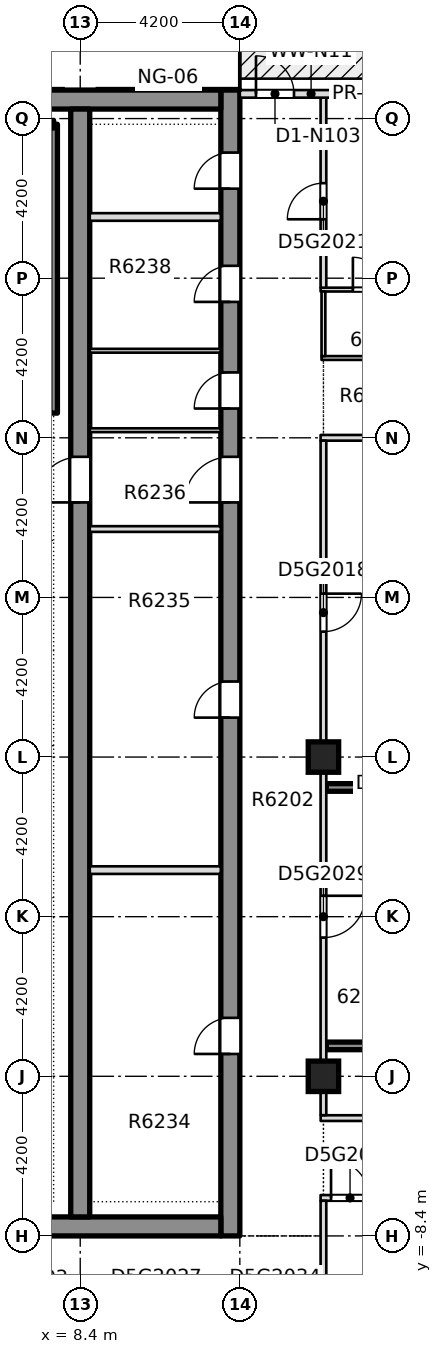
"""IFC4 building model, lengths in metres.
Left out: names, types, materials, properties, quantities, classifications, styles, units other than length and angle.
Written with IfcOpenShell. Run it as: python <this file> out.ifc"""

import sys

from ifc_helpers import new_model, si_unit, direction, frame, frame_2d, origin, origin_2d, place, context, subcontext, project, spatial, rectangle, extrude, element, fill, save


model = new_model("IFC4")
c1 = context("Model", 3, precision=1e-05, world=origin(), true_north=direction((0.0, 1.0)))
c2 = subcontext(c1, "Body", "Model", "MODEL_VIEW")
j1 = project(units=[si_unit("LENGTHUNIT", "METRE"), si_unit("PLANEANGLEUNIT", "RADIAN")], contexts=[c1])
p1 = place(None, origin())
s1 = spatial("IfcSite", under=j1, at=p1, CompositionType="ELEMENT")
p2 = place(p1, origin())
s2 = spatial("IfcBuilding", under=s1, at=p2, CompositionType="ELEMENT")
p3 = place(p2, frame((0.0, 0.0, 237.25)))
s3 = spatial("IfcBuildingStorey", under=s2, at=p3, CompositionType="ELEMENT", Elevation=237.25)
p4 = place(p3, frame((12.35, -8.4, -0.4), z_axis=(0.0, 0.0, 1.0), x_axis=(0.0, 1.0, 0.0)))
e1 = element("IfcWall", 1, at=p4, inside=s3, PredefinedType="SHEAR", context=c2, shape_type="SweptSolid", body=[
    extrude(rectangle(XDim=30.15, YDim=0.5, at=frame_2d((15.075, 0.0))), origin(), (0.0, 0.0, 1.0), 3.45),
])
p5 = place(p4, frame((4.788, 0.0, 0.4)))
e2 = element("IfcOpeningElement", 2, at=p5, cuts=e1, PredefinedType="OPENING", context=c2, shape_type="SweptSolid", body=[
    extrude(rectangle(XDim=0.95, YDim=2.1, at=frame_2d((0.475, 1.05))), frame((0.0, 0.26, 0.0), z_axis=(0.0, -1.0, 0.0), x_axis=(1.0, 0.0, 0.0)), (0.0, 0.0, 1.0), 0.52),
])
p6 = place(p4, frame((13.638, 0.0, 0.4)))
e3 = element("IfcOpeningElement", 3, at=p6, cuts=e1, PredefinedType="OPENING", context=c2, shape_type="SweptSolid", body=[
    extrude(rectangle(XDim=0.95, YDim=2.1, at=frame_2d((0.475, 1.05))), frame((0.0, 0.26, 0.0), z_axis=(0.0, -1.0, 0.0), x_axis=(1.0, 0.0, 0.0)), (0.0, 0.0, 1.0), 0.52),
])
p7 = place(p4, frame((21.771, 0.0, 0.4)))
e4 = element("IfcOpeningElement", 4, at=p7, cuts=e1, PredefinedType="OPENING", context=c2, shape_type="SweptSolid", body=[
    extrude(rectangle(XDim=0.95, YDim=2.1, at=frame_2d((0.475, 1.05))), frame((0.0, 0.26, 0.0), z_axis=(0.0, -1.0, 0.0), x_axis=(1.0, 0.0, 0.0)), (0.0, 0.0, 1.0), 0.52),
])
p8 = place(p4, frame((24.576, 0.0, 0.4)))
e5 = element("IfcOpeningElement", 5, at=p8, cuts=e1, PredefinedType="OPENING", context=c2, shape_type="SweptSolid", body=[
    extrude(rectangle(XDim=0.95, YDim=2.1, at=frame_2d((0.475, 1.05))), frame((0.0, 0.26, 0.0), z_axis=(0.0, -1.0, 0.0), x_axis=(1.0, 0.0, 0.0)), (0.0, 0.0, 1.0), 0.52),
])
p9 = place(p4, frame((27.555, 0.0, 0.4)))
e6 = element("IfcOpeningElement", 6, at=p9, cuts=e1, PredefinedType="OPENING", context=c2, shape_type="SweptSolid", body=[
    extrude(rectangle(XDim=0.95, YDim=2.1, at=frame_2d((0.475, 1.05))), frame((0.0, 0.26, 0.0), z_axis=(0.0, -1.0, 0.0), x_axis=(1.0, 0.0, 0.0)), (0.0, 0.0, 1.0), 0.52),
])
p10 = place(p4, frame((19.3, 0.0, 0.4)))
e7 = element("IfcOpeningElement", 7, at=p10, cuts=e1, PredefinedType="OPENING", context=c2, shape_type="SweptSolid", body=[
    extrude(rectangle(XDim=1.2, YDim=2.1, at=frame_2d((0.6, 1.05))), frame((0.0, 0.26, 0.0), z_axis=(0.0, -1.0, 0.0), x_axis=(1.0, 0.0, 0.0)), (0.0, 0.0, 1.0), 0.52),
])
p11 = place(p3, frame((-12.1, -8.15, -0.4), z_axis=(0.0, 0.0, 1.0), x_axis=(1.0, 0.0, 0.0)))
e8 = element("IfcWall", 8, at=p11, inside=s3, PredefinedType="SHEAR", context=c2, shape_type="SweptSolid", body=[
    extrude(rectangle(XDim=24.2, YDim=0.5, at=frame_2d((12.1, 0.0))), origin(), (0.0, 0.0, 1.0), 3.45),
])
p12 = place(p11, frame((7.35, 0.0, 0.4)))
e9 = element("IfcOpeningElement", 9, at=p12, cuts=e8, PredefinedType="OPENING", context=c2, shape_type="SweptSolid", body=[
    extrude(rectangle(XDim=1.8, YDim=2.1, at=frame_2d((0.9, 1.05))), frame((0.0, 0.26, 0.0), z_axis=(0.0, -1.0, 0.0), x_axis=(1.0, 0.0, 0.0)), (0.0, 0.0, 1.0), 0.52),
])
p13 = place(p11, frame((15.05, 0.0, 0.4)))
e10 = element("IfcOpeningElement", 10, at=p13, cuts=e8, PredefinedType="OPENING", context=c2, shape_type="SweptSolid", body=[
    extrude(rectangle(XDim=1.8, YDim=2.1, at=frame_2d((0.9, 1.05))), frame((0.0, 0.26, 0.0), z_axis=(0.0, -1.0, 0.0), x_axis=(1.0, 0.0, 0.0)), (0.0, 0.0, 1.0), 0.52),
])
p14 = place(p3, frame((-12.1, 21.5, -0.4), z_axis=(0.0, 0.0, 1.0), x_axis=(1.0, 0.0, 0.0)))
e11 = element("IfcWall", 11, at=p14, inside=s3, PredefinedType="SHEAR", context=c2, shape_type="SweptSolid", body=[
    extrude(rectangle(XDim=24.2, YDim=0.5, at=frame_2d((12.1, 0.0))), origin(), (0.0, 0.0, 1.0), 3.45),
])
p15 = place(p3, frame((8.4, -7.9, -0.4), z_axis=(0.0, 0.0, 1.0), x_axis=(0.0, 1.0, 0.0)))
e12 = element("IfcWall", 12, at=p15, inside=s3, PredefinedType="SHEAR", context=c2, shape_type="SweptSolid", body=[
    extrude(rectangle(XDim=29.15, YDim=0.5, at=frame_2d((14.575, 0.0))), origin(), (0.0, 0.0, 1.0), 3.45),
])
p16 = place(p15, frame((18.8, 0.0, 0.4)))
e13 = element("IfcOpeningElement", 13, at=p16, cuts=e12, PredefinedType="OPENING", context=c2, shape_type="SweptSolid", body=[
    extrude(rectangle(XDim=1.2, YDim=2.1, at=frame_2d((0.6, 1.05))), frame((0.0, 0.26, 0.0), z_axis=(0.0, -1.0, 0.0), x_axis=(1.0, 0.0, 0.0)), (0.0, 0.0, 1.0), 0.52),
])
for number, where, z_axis, x_axis in (
    (14, (14.8, -4.2, -0.4), (0.0, 0.0, 1.0), (1.0, 0.0, 0.0)),
    (15, (14.8, 4.2, -0.4), (0.0, 0.0, 1.0), (1.0, 0.0, 0.0)),
):
    element("IfcColumn", number, at=place(p3, frame(where, z_axis=z_axis, x_axis=x_axis)), inside=s3, PredefinedType="COLUMN", context=c2, shape_type="SweptSolid", body=[
        extrude(rectangle(XDim=0.8, YDim=0.8, at=origin_2d()), origin(), (0.0, 0.0, 1.0), 3.45),
    ])
p17 = place(p3, frame((14.725, -7.4, 0.0), z_axis=(0.0, 0.0, 1.0), x_axis=(1.0, 0.0, 0.0)))
e16 = element("IfcWall", 16, at=p17, inside=s3, PredefinedType="PARTITIONING", context=c2, shape_type="SweptSolid", body=[
    extrude(rectangle(XDim=11.025, YDim=0.15, at=frame_2d((5.512, 0.0))), origin(), (0.0, 0.0, 1.0), 3.05),
])
p18 = place(p17, frame((0.275, 0.0, 0.0)))
e17 = element("IfcOpeningElement", 17, at=p18, cuts=e16, PredefinedType="OPENING", context=c2, shape_type="SweptSolid", body=[
    extrude(rectangle(XDim=1.0, YDim=2.1, at=frame_2d((0.5, 1.05))), frame((0.0, 0.085, 0.0), z_axis=(0.0, -1.0, 0.0), x_axis=(1.0, 0.0, 0.0)), (0.0, 0.0, 1.0), 0.17),
])
p19 = place(p3, frame((14.727, -5.3, 0.0), z_axis=(0.0, 0.0, 1.0), x_axis=(1.0, 0.0, 0.0)))
e18 = element("IfcWall", 18, at=p19, inside=s3, PredefinedType="PARTITIONING", context=c2, shape_type="SweptSolid", body=[
    extrude(rectangle(XDim=11.023, YDim=0.15, at=frame_2d((5.511, 0.0))), origin(), (0.0, 0.0, 1.0), 3.05),
])
p20 = place(p3, frame((14.877, -3.4, 0.0), z_axis=(0.0, 0.0, 1.0), x_axis=(1.0, 0.0, 0.0)))
e19 = element("IfcWall", 19, at=p20, inside=s3, PredefinedType="SOLIDWALL", context=c2, shape_type="SweptSolid", body=[
    extrude(rectangle(XDim=5.571, YDim=0.2, at=frame_2d((2.786, 0.0))), origin(), (0.0, 0.0, 1.0), 3.05),
])
p21 = place(p3, frame((14.875, 3.4, 0.0), z_axis=(0.0, 0.0, 1.0), x_axis=(1.0, 0.0, 0.0)))
e20 = element("IfcWall", 20, at=p21, inside=s3, PredefinedType="SOLIDWALL", context=c2, shape_type="SweptSolid", body=[
    extrude(rectangle(XDim=5.575, YDim=0.2, at=frame_2d((2.788, 0.0))), origin(), (0.0, 0.0, 1.0), 3.05),
])
p22 = place(p3, frame((14.725, 12.6, 0.0), z_axis=(0.0, 0.0, 1.0), x_axis=(1.0, 0.0, 0.0)))
e21 = element("IfcWall", 21, at=p22, inside=s3, PredefinedType="PARTITIONING", context=c2, shape_type="SweptSolid", body=[
    extrude(rectangle(XDim=2.525, YDim=0.15, at=frame_2d((1.262, 0.0))), origin(), (0.0, 0.0, 1.0), 3.05),
])
p23 = place(p3, frame((14.75, 14.7, 0.0), z_axis=(0.0, 0.0, 1.0), x_axis=(1.0, 0.0, 0.0)))
e22 = element("IfcWall", 22, at=p23, inside=s3, PredefinedType="PARTITIONING", context=c2, shape_type="SweptSolid", body=[
    extrude(rectangle(XDim=2.5, YDim=0.1, at=frame_2d((1.25, 0.0))), origin(), (0.0, 0.0, 1.0), 3.05),
])
p24 = place(p3, frame((14.725, 16.5, 0.0), z_axis=(0.0, 0.0, 1.0), x_axis=(1.0, 0.0, 0.0)))
e23 = element("IfcWall", 23, at=p24, inside=s3, PredefinedType="PARTITIONING", context=c2, shape_type="SweptSolid", body=[
    extrude(rectangle(XDim=2.525, YDim=0.1, at=frame_2d((1.262, 0.0))), origin(), (0.0, 0.0, 1.0), 3.05),
])
p25 = place(p24, frame((0.85, 0.0, 0.0)))
e24 = element("IfcOpeningElement", 24, at=p25, cuts=e23, PredefinedType="OPENING", context=c2, shape_type="SweptSolid", body=[
    extrude(rectangle(XDim=0.85, YDim=2.1, at=frame_2d((0.425, 1.05))), frame((0.0, 0.06, 0.0), z_axis=(0.0, -1.0, 0.0), x_axis=(1.0, 0.0, 0.0)), (0.0, 0.0, 1.0), 0.12),
])
p26 = place(p3, frame((14.8, -10.525, 0.0), z_axis=(0.0, 0.0, 1.0), x_axis=(0.0, 1.0, 0.0)))
e25 = element("IfcWall", 25, at=p26, inside=s3, PredefinedType="PARTITIONING", context=c2, shape_type="SweptSolid", body=[
    extrude(rectangle(XDim=3.05, YDim=0.15, at=frame_2d((1.525, 0.0))), origin(), (0.0, 0.0, 1.0), 3.05),
])
p27 = place(p3, frame((14.8, -5.223, 0.0), z_axis=(0.0, 0.0, 1.0), x_axis=(0.0, 1.0, 0.0)))
e26 = element("IfcWall", 26, at=p27, inside=s3, PredefinedType="PARTITIONING", context=c2, shape_type="SweptSolid", body=[
    extrude(rectangle(XDim=17.748, YDim=0.15, at=frame_2d((8.874, 0.0))), origin(), (0.0, 0.0, 1.0), 3.05),
])
p28 = place(p27, frame((12.723, 0.0, 0.0)))
e27 = element("IfcOpeningElement", 27, at=p28, cuts=e26, PredefinedType="OPENING", context=c2, shape_type="SweptSolid", body=[
    extrude(rectangle(XDim=1.0, YDim=2.1, at=frame_2d((0.5, 1.05))), frame((0.0, 0.085, 0.0), z_axis=(0.0, -1.0, 0.0), x_axis=(1.0, 0.0, 0.0)), (0.0, 0.0, 1.0), 0.17),
])
p29 = place(p27, frame((4.673, 0.0, 0.0)))
e28 = element("IfcOpeningElement", 28, at=p29, cuts=e26, PredefinedType="OPENING", context=c2, shape_type="SweptSolid", body=[
    extrude(rectangle(XDim=1.1, YDim=2.1, at=frame_2d((0.55, 1.05))), frame((0.0, 0.085, 0.0), z_axis=(0.0, -1.0, 0.0), x_axis=(1.0, 0.0, 0.0)), (0.0, 0.0, 1.0), 0.17),
])
p30 = place(p3, frame((14.8, 14.75, 0.0), z_axis=(0.0, 0.0, 1.0), x_axis=(0.0, 1.0, 0.0)))
e29 = element("IfcWall", 29, at=p30, inside=s3, PredefinedType="PARTITIONING", context=c2, shape_type="SweptSolid", body=[
    extrude(rectangle(XDim=1.7, YDim=0.1, at=frame_2d((0.85, 0.0))), origin(), (0.0, 0.0, 1.0), 3.05),
])
p31 = place(p3, frame((14.8, 16.55, 0.0), z_axis=(0.0, 0.0, 1.0), x_axis=(0.0, 1.0, 0.0)))
e30 = element("IfcWall", 30, at=p31, inside=s3, PredefinedType="PARTITIONING", context=c2, shape_type="SweptSolid", body=[
    extrude(rectangle(XDim=5.0, YDim=0.15, at=frame_2d((2.5, 0.0))), origin(), (0.0, 0.0, 1.0), 3.05),
])
p32 = place(p31, frame((1.8, 0.0, 0.0)))
e31 = element("IfcOpeningElement", 31, at=p32, cuts=e30, PredefinedType="OPENING", context=c2, shape_type="SweptSolid", body=[
    extrude(rectangle(XDim=0.95, YDim=2.1, at=frame_2d((0.475, 1.05))), frame((0.0, 0.085, 0.0), z_axis=(0.0, -1.0, 0.0), x_axis=(1.0, 0.0, 0.0)), (0.0, 0.0, 1.0), 0.17),
])
p33 = place(p3, frame((16.35, 21.65, 0.0), z_axis=(0.0, 0.0, 1.0), x_axis=(-1.0, 0.0, 0.0)))
e32 = element("IfcWall", 32, at=p33, inside=s3, PredefinedType="STANDARD", context=c2, shape_type="SweptSolid", body=[
    extrude(rectangle(XDim=3.75, YDim=0.2, at=frame_2d((1.875, 0.0))), origin(), (0.0, 0.0, 1.0), 3.05),
])
p34 = place(p33, frame((2.325, 0.0, 0.0)))
e33 = element("IfcOpeningElement", 33, at=p34, cuts=e32, PredefinedType="OPENING", context=c2, shape_type="SweptSolid", body=[
    extrude(rectangle(XDim=1.0, YDim=2.4, at=frame_2d((0.5, 1.2))), frame((0.0, 0.11, 0.0), z_axis=(0.0, -1.0, 0.0), x_axis=(1.0, 0.0, 0.0)), (0.0, 0.0, 1.0), 0.22),
])
p35 = place(p3, frame((8.651, 1.225, 0.0), z_axis=(0.0, 0.0, 1.0), x_axis=(1.0, 0.0, 0.0)))
e34 = element("IfcWall", 34, at=p35, inside=s3, PredefinedType="PARTITIONING", context=c2, shape_type="SweptSolid", body=[
    extrude(rectangle(XDim=3.448, YDim=0.2, at=frame_2d((1.724, 0.0))), origin(), (0.0, 0.0, 1.0), 3.05),
])
p36 = place(p3, frame((8.651, 10.2, 0.0), z_axis=(0.0, 0.0, 1.0), x_axis=(1.0, 0.0, 0.0)))
e35 = element("IfcWall", 35, at=p36, inside=s3, PredefinedType="PARTITIONING", context=c2, shape_type="SweptSolid", body=[
    extrude(rectangle(XDim=3.448, YDim=0.15, at=frame_2d((1.724, 0.0))), origin(), (0.0, 0.0, 1.0), 3.05),
])
for number, where, z_axis, x_axis in (
    (36, (8.651, 12.8, 0.0), (0.0, 0.0, 1.0), (1.0, 0.0, 0.0)),
    (37, (8.651, 14.891, 0.0), (0.0, 0.0, 1.0), (1.0, 0.0, 0.0)),
):
    element("IfcWall", number, at=place(p3, frame(where, z_axis=z_axis, x_axis=x_axis)), inside=s3, PredefinedType="PARTITIONING", context=c2, shape_type="SweptSolid", body=[
        extrude(rectangle(XDim=3.448, YDim=0.1, at=frame_2d((1.724, 0.0))), origin(), (0.0, 0.0, 1.0), 3.05),
    ])
p37 = place(p3, frame((8.651, 18.411, 0.0), z_axis=(0.0, 0.0, 1.0), x_axis=(1.0, 0.0, 0.0)))
e38 = element("IfcWall", 38, at=p37, inside=s3, PredefinedType="PARTITIONING", context=c2, shape_type="SweptSolid", body=[
    extrude(rectangle(XDim=3.448, YDim=0.2, at=frame_2d((1.724, 0.0))), origin(), (0.0, 0.0, 1.0), 3.05),
])
p38 = place(p3, frame((7.7, 13.25, 0.0), z_axis=(0.0, 0.0, 1.0), x_axis=(0.0, 1.0, 0.0)))
e39 = element("IfcWall", 39, at=p38, inside=s3, PredefinedType="SOLIDWALL", context=c2, shape_type="SweptSolid", body=[
    extrude(rectangle(XDim=7.6, YDim=0.2, at=frame_2d((3.8, 0.0))), origin(), (0.0, 0.0, 1.0), 3.05),
])
p39 = place(p3, frame((4.1, 20.85, 0.0), z_axis=(0.0, 0.0, 1.0), x_axis=(1.0, 0.0, 0.0)))
e40 = element("IfcWall", 40, at=p39, inside=s3, PredefinedType="SOLIDWALL", context=c2, shape_type="SweptSolid", body=[
    extrude(rectangle(XDim=3.6, YDim=0.2, at=frame_2d((1.8, 0.0))), origin(), (0.0, 0.0, 1.0), 3.05),
])
p40 = place(p18, origin())
e41 = element("IfcDoor", 41, at=p40, inside=s3, OperationType="SINGLE_SWING_RIGHT", PredefinedType="DOOR", context=c2, shape_type="SweptSolid", body=[
    extrude(rectangle(XDim=1.0, YDim=2.1, at=frame_2d((0.5, 1.05))), frame((0.0, 0.025, 0.0), z_axis=(0.0, -1.0, 0.0), x_axis=(1.0, 0.0, 0.0)), (0.0, 0.0, 1.0), 0.05),
])
fill(e17, e41)
p41 = place(p28, origin())
e42 = element("IfcDoor", 42, at=p41, inside=s3, OperationType="SINGLE_SWING_LEFT", PredefinedType="DOOR", context=c2, shape_type="SweptSolid", body=[
    extrude(rectangle(XDim=1.0, YDim=2.1, at=frame_2d((0.5, 1.05))), frame((0.0, 0.025, 0.0), z_axis=(0.0, -1.0, 0.0), x_axis=(1.0, 0.0, 0.0)), (0.0, 0.0, 1.0), 0.05),
])
fill(e27, e42)
p42 = place(p32, origin())
e43 = element("IfcDoor", 43, at=p42, inside=s3, OperationType="SINGLE_SWING_LEFT", PredefinedType="DOOR", context=c2, shape_type="SweptSolid", body=[
    extrude(rectangle(XDim=0.95, YDim=2.1, at=frame_2d((0.475, 1.05))), frame((0.0, 0.025, 0.0), z_axis=(0.0, -1.0, 0.0), x_axis=(1.0, 0.0, 0.0)), (0.0, 0.0, 1.0), 0.05),
])
fill(e31, e43)
p43 = place(p25, origin())
e44 = element("IfcDoor", 44, at=p43, inside=s3, OperationType="SINGLE_SWING_RIGHT", PredefinedType="DOOR", context=c2, shape_type="SweptSolid", body=[
    extrude(rectangle(XDim=0.85, YDim=2.1, at=frame_2d((0.425, 1.05))), frame((0.0, 0.025, 0.0), z_axis=(0.0, -1.0, 0.0), x_axis=(1.0, 0.0, 0.0)), (0.0, 0.0, 1.0), 0.05),
])
fill(e24, e44)
p44 = place(p29, origin())
e45 = element("IfcDoor", 45, at=p44, inside=s3, OperationType="SINGLE_SWING_RIGHT", PredefinedType="DOOR", context=c2, shape_type="SweptSolid", body=[
    extrude(rectangle(XDim=1.1, YDim=2.1, at=frame_2d((0.55, 1.05))), frame((0.0, 0.025, 0.0), z_axis=(0.0, -1.0, 0.0), x_axis=(1.0, 0.0, 0.0)), (0.0, 0.0, 1.0), 0.05),
])
fill(e28, e45)
p45 = place(p34, origin())
e46 = element("IfcDoor", 46, at=p45, inside=s3, OperationType="SINGLE_SWING_LEFT", PredefinedType="DOOR", context=c2, shape_type="SweptSolid", body=[
    extrude(rectangle(XDim=1.0, YDim=2.4, at=frame_2d((0.5, 1.2))), frame((0.0, 0.025, 0.0), z_axis=(0.0, -1.0, 0.0), x_axis=(1.0, 0.0, 0.0)), (0.0, 0.0, 1.0), 0.05),
])
fill(e33, e46)
p46 = place(p5, origin())
e47 = element("IfcDoor", 47, at=p46, inside=s3, OperationType="SINGLE_SWING_LEFT", PredefinedType="DOOR", context=c2, shape_type="SweptSolid", body=[
    extrude(rectangle(XDim=0.95, YDim=2.1, at=frame_2d((0.475, 1.05))), frame((0.0, 0.025, 0.0), z_axis=(0.0, -1.0, 0.0), x_axis=(1.0, 0.0, 0.0)), (0.0, 0.0, 1.0), 0.05),
])
fill(e2, e47)
p47 = place(p6, origin())
e48 = element("IfcDoor", 48, at=p47, inside=s3, OperationType="SINGLE_SWING_LEFT", PredefinedType="DOOR", context=c2, shape_type="SweptSolid", body=[
    extrude(rectangle(XDim=0.95, YDim=2.1, at=frame_2d((0.475, 1.05))), frame((0.0, 0.025, 0.0), z_axis=(0.0, -1.0, 0.0), x_axis=(1.0, 0.0, 0.0)), (0.0, 0.0, 1.0), 0.05),
])
fill(e3, e48)
p48 = place(p7, origin())
e49 = element("IfcDoor", 49, at=p48, inside=s3, OperationType="SINGLE_SWING_LEFT", PredefinedType="DOOR", context=c2, shape_type="SweptSolid", body=[
    extrude(rectangle(XDim=0.95, YDim=2.1, at=frame_2d((0.475, 1.05))), frame((0.0, 0.025, 0.0), z_axis=(0.0, -1.0, 0.0), x_axis=(1.0, 0.0, 0.0)), (0.0, 0.0, 1.0), 0.05),
])
fill(e4, e49)
p49 = place(p8, origin())
e50 = element("IfcDoor", 50, at=p49, inside=s3, OperationType="SINGLE_SWING_LEFT", PredefinedType="DOOR", context=c2, shape_type="SweptSolid", body=[
    extrude(rectangle(XDim=0.95, YDim=2.1, at=frame_2d((0.475, 1.05))), frame((0.0, 0.025, 0.0), z_axis=(0.0, -1.0, 0.0), x_axis=(1.0, 0.0, 0.0)), (0.0, 0.0, 1.0), 0.05),
])
fill(e5, e50)
p50 = place(p9, origin())
e51 = element("IfcDoor", 51, at=p50, inside=s3, OperationType="SINGLE_SWING_LEFT", PredefinedType="DOOR", context=c2, shape_type="SweptSolid", body=[
    extrude(rectangle(XDim=0.95, YDim=2.1, at=frame_2d((0.475, 1.05))), frame((0.0, 0.025, 0.0), z_axis=(0.0, -1.0, 0.0), x_axis=(1.0, 0.0, 0.0)), (0.0, 0.0, 1.0), 0.05),
])
fill(e6, e51)
p51 = place(p10, origin())
e52 = element("IfcDoor", 52, at=p51, inside=s3, OperationType="SINGLE_SWING_LEFT", PredefinedType="DOOR", context=c2, shape_type="SweptSolid", body=[
    extrude(rectangle(XDim=1.2, YDim=2.1, at=frame_2d((0.6, 1.05))), frame((0.0, 0.025, 0.0), z_axis=(0.0, -1.0, 0.0), x_axis=(1.0, 0.0, 0.0)), (0.0, 0.0, 1.0), 0.05),
])
fill(e7, e52)
p52 = place(p16, origin())
e53 = element("IfcDoor", 53, at=p52, inside=s3, OperationType="SINGLE_SWING_LEFT", PredefinedType="DOOR", context=c2, shape_type="SweptSolid", body=[
    extrude(rectangle(XDim=1.2, YDim=2.1, at=frame_2d((0.6, 1.05))), frame((0.0, 0.025, 0.0), z_axis=(0.0, -1.0, 0.0), x_axis=(1.0, 0.0, 0.0)), (0.0, 0.0, 1.0), 0.05),
])
fill(e13, e53)
save(model, sys.argv[1])
